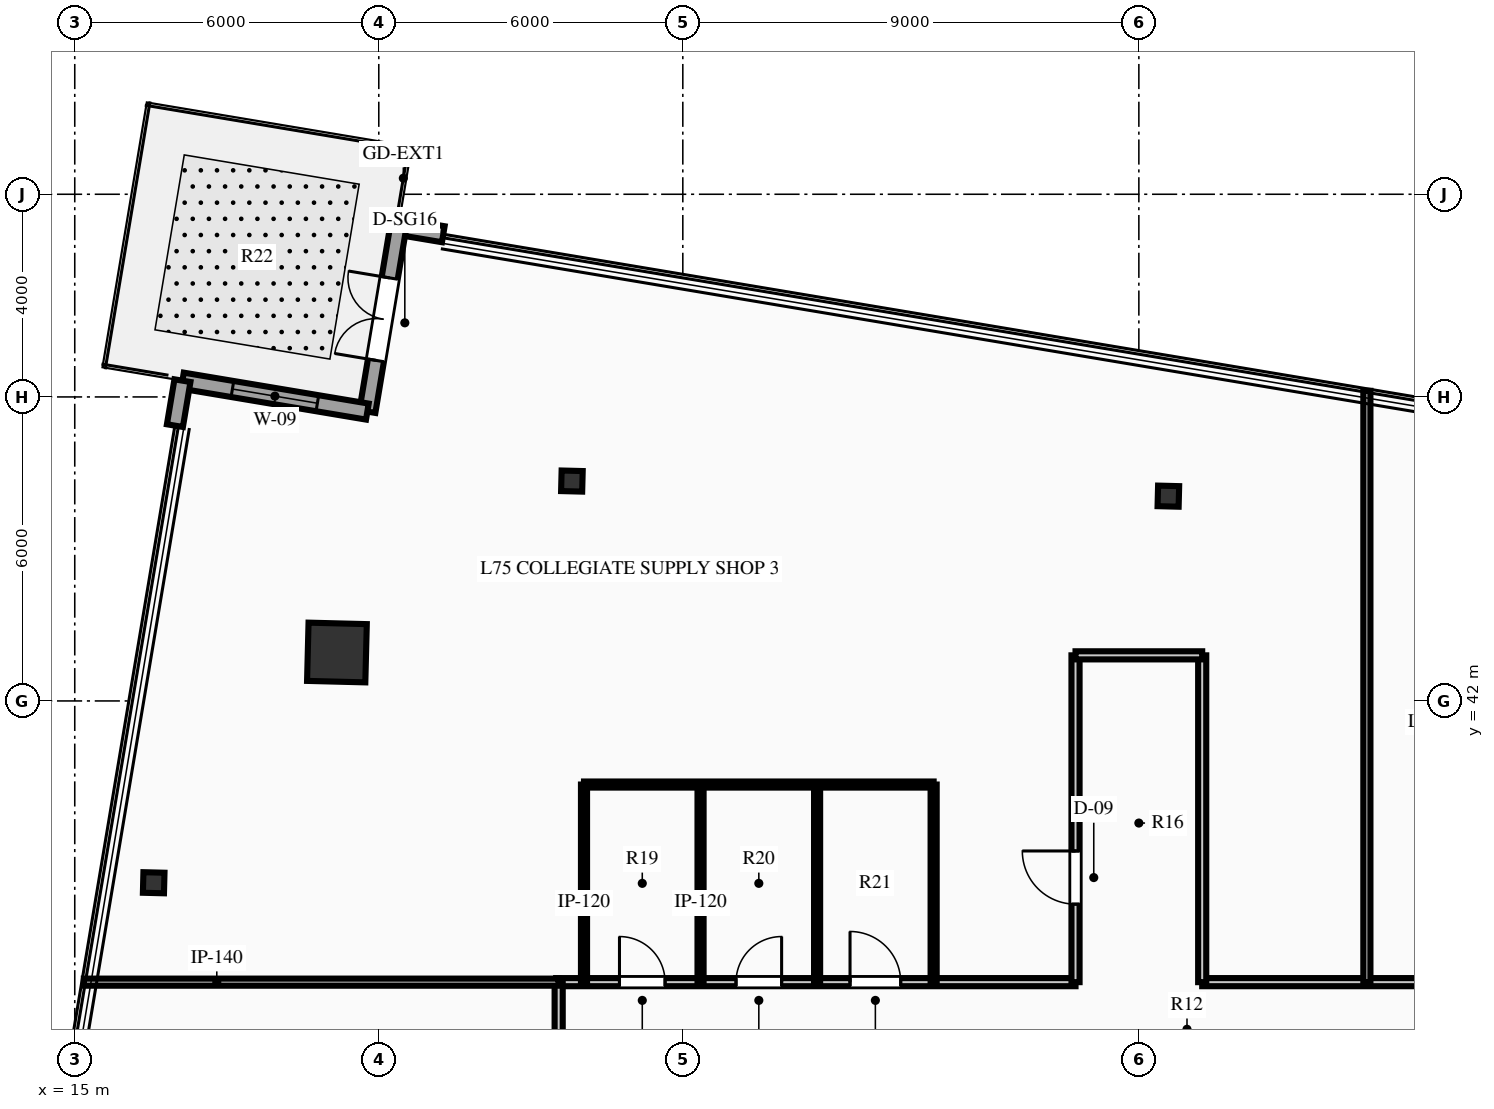
"""IFC4 building model, lengths in metres.
Left out: names, types, materials, properties, quantities, classifications, styles, units other than length and angle.
Written with IfcOpenShell. Run it as: python <this file> out.ifc"""

import sys

from ifc_helpers import new_model, si_unit, direction, frame, frame_2d, origin, origin_2d, place, context, subcontext, project, spatial, rectangle, hollow_rectangle, i_section, extrude, element, fill, save


model = new_model("IFC4")
c1 = context("Model", 3, precision=1e-05, world=origin(), true_north=direction((0.0, 1.0)))
c2 = subcontext(c1, "Body", "Model", "MODEL_VIEW")
j1 = project(units=[si_unit("LENGTHUNIT", "METRE"), si_unit("PLANEANGLEUNIT", "RADIAN")], contexts=[c1])
p1 = place(None, origin())
s1 = spatial("IfcSite", under=j1, at=p1, CompositionType="ELEMENT")
p2 = place(p1, origin())
s2 = spatial("IfcBuilding", under=s1, at=p2, CompositionType="ELEMENT")
p3 = place(p2, frame((0.0, 0.0, 298.2)))
s3 = spatial("IfcBuildingStorey", under=s2, at=p3, CompositionType="ELEMENT", Elevation=298.2)
p4 = place(p3, frame((20.174, 42.956, 0.0), z_axis=(0.0, 0.0, 1.0), x_axis=(0.025304572866, 0.999679788028, 0.0)))
e1 = element("IfcColumn", 1, at=p4, inside=s3, PredefinedType="COLUMN", context=c2, shape_type="SweptSolid", body=[
    extrude(hollow_rectangle(XDim=1.15, YDim=1.15, WallThickness=0.05, at=origin_2d()), origin(), (0.0, 0.0, 1.0), 4.5),
])
for number, where, z_axis, x_axis in (
    (2, (36.582, 46.042, 0.0), (0.0, 0.0, 1.0), (0.025, 1.0, 0.0)),
    (3, (24.811, 46.34, 0.0), (0.0, 0.0, 1.0), (0.025, 1.0, 0.0)),
    (4, (16.558, 38.412, 0.0), (0.0, 0.0, 1.0), (0.025, 1.0, 0.0)),
):
    element("IfcColumn", number, at=place(p3, frame(where, z_axis=z_axis, x_axis=x_axis)), inside=s3, PredefinedType="COLUMN", context=c2, shape_type="SweptSolid", body=[
        extrude(i_section(OverallWidth=0.406, OverallDepth=0.416, WebThickness=0.03, FlangeThickness=0.048, at=origin_2d()), origin(), (0.0, 0.0, 1.0), 4.5),
    ])
p5 = place(p3, frame((21.385, 51.36, 0.0), z_axis=(0.0, 0.0, 1.0), x_axis=(0.98630580598, -0.164926823442, 0.0)))
e5 = element("IfcWall", 5, at=p5, inside=s3, PredefinedType="STANDARD", context=c2, shape_type="SweptSolid", body=[
    extrude(rectangle(XDim=0.9, YDim=0.32, at=frame_2d((0.45, 0.0))), origin(), (0.0, 0.0, 1.0), 4.24),
])
p6 = place(p3, frame((20.774, 47.711, 0.0), z_axis=(0.0, 0.0, 1.0), x_axis=(0.165094463979, 0.986277759033, 0.0)))
e6 = element("IfcWall", 6, at=p6, inside=s3, PredefinedType="STANDARD", context=c2, shape_type="SweptSolid", body=[
    extrude(rectangle(XDim=3.7, YDim=0.32, at=frame_2d((1.85, 0.0))), origin(), (0.0, 0.0, 1.0), 4.24),
])
p7 = place(p6, frame((1.025, 0.0, 0.0)))
e7 = element("IfcOpeningElement", 7, at=p7, cuts=e6, PredefinedType="OPENING", context=c2, shape_type="SweptSolid", body=[
    extrude(rectangle(XDim=1.65, YDim=2.35, at=frame_2d((0.825, 1.175))), frame((0.0, 0.17, 0.0), z_axis=(0.0, -1.0, 0.0), x_axis=(1.0, 0.0, 0.0)), (0.0, 0.0, 1.0), 0.34),
])
p8 = place(p3, frame((17.125, 48.321, 0.0), z_axis=(0.0, 0.0, 1.0), x_axis=(0.986288501332, -0.165030276432, 0.0)))
e8 = element("IfcWall", 8, at=p8, inside=s3, PredefinedType="STANDARD", context=c2, shape_type="SweptSolid", body=[
    extrude(rectangle(XDim=3.7, YDim=0.32, at=frame_2d((1.85, 0.0))), origin(), (0.0, 0.0, 1.0), 4.24),
])
p9 = place(p8, frame((1.0, 0.0, 0.75)))
e9 = element("IfcOpeningElement", 9, at=p9, cuts=e8, PredefinedType="OPENING", context=c2, shape_type="SweptSolid", body=[
    extrude(rectangle(XDim=1.7, YDim=2.5, at=frame_2d((0.85, 1.25))), frame((0.0, 0.17, 0.0), z_axis=(0.0, -1.0, 0.0), x_axis=(1.0, 0.0, 0.0)), (0.0, 0.0, 1.0), 0.34),
])
p10 = place(p3, frame((16.977, 47.434, 0.0), z_axis=(0.0, 0.0, 1.0), x_axis=(0.164926823442, 0.98630580598, 0.0)))
e10 = element("IfcWall", 10, at=p10, inside=s3, PredefinedType="STANDARD", context=c2, shape_type="SweptSolid", body=[
    extrude(rectangle(XDim=0.9, YDim=0.32, at=frame_2d((0.45, 0.0))), origin(), (0.0, 0.0, 1.0), 4.24),
])
p11 = place(p3, frame((24.5, 36.45, 0.0), z_axis=(0.0, 0.0, 1.0), x_axis=(1.0, 0.0, 0.0)))
e11 = element("IfcWall", 11, at=p11, inside=s3, PredefinedType="PARTITIONING", context=c2, shape_type="SweptSolid", body=[
    extrude(rectangle(XDim=10.25, YDim=0.16, at=frame_2d((5.125, 0.0))), origin(), (0.0, 0.0, 1.0), 4.24),
])
p12 = place(p11, frame((1.25, 0.0, 0.0)))
e12 = element("IfcOpeningElement", 12, at=p12, cuts=e11, PredefinedType="OPENING", context=c2, shape_type="SweptSolid", body=[
    extrude(rectangle(XDim=0.9, YDim=2.15, at=frame_2d((0.45, 1.075))), frame((0.0, 0.09, 0.0), z_axis=(0.0, -1.0, 0.0), x_axis=(1.0, 0.0, 0.0)), (0.0, 0.0, 1.0), 0.18),
])
p13 = place(p11, frame((3.55, 0.0, 0.0)))
e13 = element("IfcOpeningElement", 13, at=p13, cuts=e11, PredefinedType="OPENING", context=c2, shape_type="SweptSolid", body=[
    extrude(rectangle(XDim=0.9, YDim=2.15, at=frame_2d((0.45, 1.075))), frame((0.0, 0.09, 0.0), z_axis=(0.0, -1.0, 0.0), x_axis=(1.0, 0.0, 0.0)), (0.0, 0.0, 1.0), 0.18),
])
p14 = place(p11, frame((5.8, 0.0, 0.0)))
e14 = element("IfcOpeningElement", 14, at=p14, cuts=e11, PredefinedType="OPENING", context=c2, shape_type="SweptSolid", body=[
    extrude(rectangle(XDim=1.0, YDim=2.15, at=frame_2d((0.5, 1.075))), frame((0.0, 0.09, 0.0), z_axis=(0.0, -1.0, 0.0), x_axis=(1.0, 0.0, 0.0)), (0.0, 0.0, 1.0), 0.18),
])
p15 = place(p3, frame((37.25, 36.45, 0.0), z_axis=(0.0, 0.0, 1.0), x_axis=(1.0, 0.0, 0.0)))
e15 = element("IfcWall", 15, at=p15, inside=s3, PredefinedType="PARTITIONING", context=c2, shape_type="SweptSolid", body=[
    extrude(rectangle(XDim=10.25, YDim=0.16, at=frame_2d((5.125, 0.0))), origin(), (0.0, 0.0, 1.0), 4.24),
])
p16 = place(p15, frame((4.365, 0.0, 0.0)))
e16 = element("IfcOpeningElement", 16, at=p16, cuts=e15, PredefinedType="OPENING", context=c2, shape_type="SweptSolid", body=[
    extrude(rectangle(XDim=1.05, YDim=2.15, at=frame_2d((0.525, 1.075))), frame((0.0, 0.09, 0.0), z_axis=(0.0, -1.0, 0.0), x_axis=(1.0, 0.0, 0.0)), (0.0, 0.0, 1.0), 0.18),
])
p17 = place(p15, frame((8.925, 0.0, 0.0)))
e17 = element("IfcOpeningElement", 17, at=p17, cuts=e15, PredefinedType="OPENING", context=c2, shape_type="SweptSolid", body=[
    extrude(rectangle(XDim=0.9, YDim=2.15, at=frame_2d((0.45, 1.075))), frame((0.0, 0.09, 0.0), z_axis=(0.0, -1.0, 0.0), x_axis=(1.0, 0.0, 0.0)), (0.0, 0.0, 1.0), 0.18),
])
p18 = place(p3, frame((24.55, 27.25, 0.0), z_axis=(0.0, 0.0, 1.0), x_axis=(0.0, 1.0, 0.0)))
e18 = element("IfcWall", 18, at=p18, inside=s3, PredefinedType="PARTITIONING", context=c2, shape_type="SweptSolid", body=[
    extrude(rectangle(XDim=9.2, YDim=0.16, at=frame_2d((4.6, 0.0))), origin(), (0.0, 0.0, 1.0), 4.24),
])
p19 = place(p18, frame((4.075, 0.0, 0.0)))
e19 = element("IfcOpeningElement", 19, at=p19, cuts=e18, PredefinedType="OPENING", context=c2, shape_type="SweptSolid", body=[
    extrude(rectangle(XDim=1.05, YDim=2.15, at=frame_2d((0.525, 1.075))), frame((0.0, 0.09, 0.0), z_axis=(0.0, -1.0, 0.0), x_axis=(1.0, 0.0, 0.0)), (0.0, 0.0, 1.0), 0.18),
])
p20 = place(p3, frame((34.75, 36.45, 0.0), z_axis=(0.0, 0.0, 1.0), x_axis=(0.0, 1.0, 0.0)))
e20 = element("IfcWall", 20, at=p20, inside=s3, PredefinedType="PARTITIONING", context=c2, shape_type="SweptSolid", body=[
    extrude(rectangle(XDim=6.45, YDim=0.16, at=frame_2d((3.225, 0.0))), origin(), (0.0, 0.0, 1.0), 4.24),
])
p21 = place(p20, frame((1.539, 0.0, 0.0)))
e21 = element("IfcOpeningElement", 21, at=p21, cuts=e20, PredefinedType="OPENING", context=c2, shape_type="SweptSolid", body=[
    extrude(rectangle(XDim=1.05, YDim=2.15, at=frame_2d((0.525, 1.075))), frame((0.0, 0.09, 0.0), z_axis=(0.0, -1.0, 0.0), x_axis=(1.0, 0.0, 0.0)), (0.0, 0.0, 1.0), 0.18),
])
p22 = place(p3, frame((37.25, 36.45, 0.0), z_axis=(0.0, 0.0, 1.0), x_axis=(0.0, 1.0, 0.0)))
e22 = element("IfcWall", 22, at=p22, inside=s3, PredefinedType="PARTITIONING", context=c2, shape_type="SweptSolid", body=[
    extrude(rectangle(XDim=6.45, YDim=0.16, at=frame_2d((3.225, 0.0))), origin(), (0.0, 0.0, 1.0), 4.24),
])
p23 = place(p3, frame((34.75, 42.9, 0.0), z_axis=(0.0, 0.0, 1.0), x_axis=(1.0, 0.0, 0.0)))
e23 = element("IfcWall", 23, at=p23, inside=s3, PredefinedType="PARTITIONING", context=c2, shape_type="SweptSolid", body=[
    extrude(rectangle(XDim=2.5, YDim=0.16, at=frame_2d((1.25, 0.0))), origin(), (0.0, 0.0, 1.0), 4.24),
])
for number, where, z_axis, x_axis in (
    (24, (25.05, 36.45, 0.0), (0.0, 0.0, 1.0), (0.0, 1.0, 0.0)),
    (25, (27.35, 36.45, 0.0), (0.0, 0.0, 1.0), (0.0, 1.0, 0.0)),
    (26, (29.65, 36.45, 0.0), (0.0, 0.0, 1.0), (0.0, 1.0, 0.0)),
    (27, (31.95, 36.45, 0.0), (0.0, 0.0, 1.0), (0.0, 1.0, 0.0)),
):
    element("IfcWall", number, at=place(p3, frame(where, z_axis=z_axis, x_axis=x_axis)), inside=s3, PredefinedType="PARTITIONING", context=c2, shape_type="SweptSolid", body=[
        extrude(rectangle(XDim=3.9, YDim=0.12, at=frame_2d((1.95, 0.0))), origin(), (0.0, 0.0, 1.0), 4.24),
    ])
p24 = place(p3, frame((25.05, 40.35, 0.0), z_axis=(0.0, 0.0, 1.0), x_axis=(1.0, 0.0, 0.0)))
e28 = element("IfcWall", 28, at=p24, inside=s3, PredefinedType="PARTITIONING", context=c2, shape_type="SweptSolid", body=[
    extrude(rectangle(XDim=6.9, YDim=0.12, at=frame_2d((3.45, 0.0))), origin(), (0.0, 0.0, 1.0), 4.24),
])
p25 = place(p3, frame((15.179, 36.45, 0.0), z_axis=(0.0, 0.0, 1.0), x_axis=(1.0, 0.0, 0.0)))
e29 = element("IfcWall", 29, at=p25, inside=s3, PredefinedType="PARTITIONING", context=c2, shape_type="SweptSolid", body=[
    extrude(rectangle(XDim=9.371, YDim=0.14, at=frame_2d((4.686, 0.0))), origin(), (0.0, 0.0, 1.0), 3.618),
])
p26 = place(p3, frame((40.5, 36.45, 0.0), z_axis=(0.0, 0.0, 1.0), x_axis=(0.0, 1.0, 0.0)))
e30 = element("IfcWall", 30, at=p26, inside=s3, PredefinedType="PARTITIONING", context=c2, shape_type="SweptSolid", body=[
    extrude(rectangle(XDim=11.671, YDim=0.14, at=frame_2d((5.835, 0.0))), origin(), (0.0, 0.0, 1.0), 4.24),
])
p27 = place(p7, origin())
e31 = element("IfcDoor", 31, at=p27, inside=s3, OperationType="DOUBLE_DOOR_SINGLE_SWING", PredefinedType="DOOR", context=c2, shape_type="SweptSolid", body=[
    extrude(rectangle(XDim=1.65, YDim=2.35, at=frame_2d((0.825, 1.175))), frame((0.0, 0.025, 0.0), z_axis=(0.0, -1.0, 0.0), x_axis=(1.0, 0.0, 0.0)), (0.0, 0.0, 1.0), 0.05),
])
fill(e7, e31)
p28 = place(p9, origin())
e32 = element("IfcWindow", 32, at=p28, inside=s3, PartitioningType="SINGLE_PANEL", PredefinedType="WINDOW", context=c2, shape_type="SweptSolid", body=[
    extrude(rectangle(XDim=1.7, YDim=2.5, at=frame_2d((0.85, 1.25))), frame((0.0, 0.03, 0.0), z_axis=(0.0, -1.0, 0.0), x_axis=(1.0, 0.0, 0.0)), (0.0, 0.0, 1.0), 0.06),
])
fill(e9, e32)
p29 = place(p12, origin())
e33 = element("IfcDoor", 33, at=p29, inside=s3, OperationType="SINGLE_SWING_LEFT", PredefinedType="DOOR", context=c2, shape_type="SweptSolid", body=[
    extrude(rectangle(XDim=0.9, YDim=2.15, at=frame_2d((0.45, 1.075))), frame((0.0, 0.025, 0.0), z_axis=(0.0, -1.0, 0.0), x_axis=(1.0, 0.0, 0.0)), (0.0, 0.0, 1.0), 0.05),
])
fill(e12, e33)
p30 = place(p13, origin())
e34 = element("IfcDoor", 34, at=p30, inside=s3, OperationType="SINGLE_SWING_RIGHT", PredefinedType="DOOR", context=c2, shape_type="SweptSolid", body=[
    extrude(rectangle(XDim=0.9, YDim=2.15, at=frame_2d((0.45, 1.075))), frame((0.0, 0.025, 0.0), z_axis=(0.0, -1.0, 0.0), x_axis=(1.0, 0.0, 0.0)), (0.0, 0.0, 1.0), 0.05),
])
fill(e13, e34)
p31 = place(p14, origin())
e35 = element("IfcDoor", 35, at=p31, inside=s3, OperationType="SINGLE_SWING_LEFT", PredefinedType="DOOR", context=c2, shape_type="SweptSolid", body=[
    extrude(rectangle(XDim=1.0, YDim=2.15, at=frame_2d((0.5, 1.075))), frame((0.0, 0.025, 0.0), z_axis=(0.0, -1.0, 0.0), x_axis=(1.0, 0.0, 0.0)), (0.0, 0.0, 1.0), 0.05),
])
fill(e14, e35)
p32 = place(p21, origin())
e36 = element("IfcDoor", 36, at=p32, inside=s3, OperationType="SINGLE_SWING_RIGHT", PredefinedType="DOOR", context=c2, shape_type="SweptSolid", body=[
    extrude(rectangle(XDim=1.05, YDim=2.15, at=frame_2d((0.525, 1.075))), frame((0.0, 0.025, 0.0), z_axis=(0.0, -1.0, 0.0), x_axis=(1.0, 0.0, 0.0)), (0.0, 0.0, 1.0), 0.05),
])
fill(e21, e36)
save(model, sys.argv[1])
